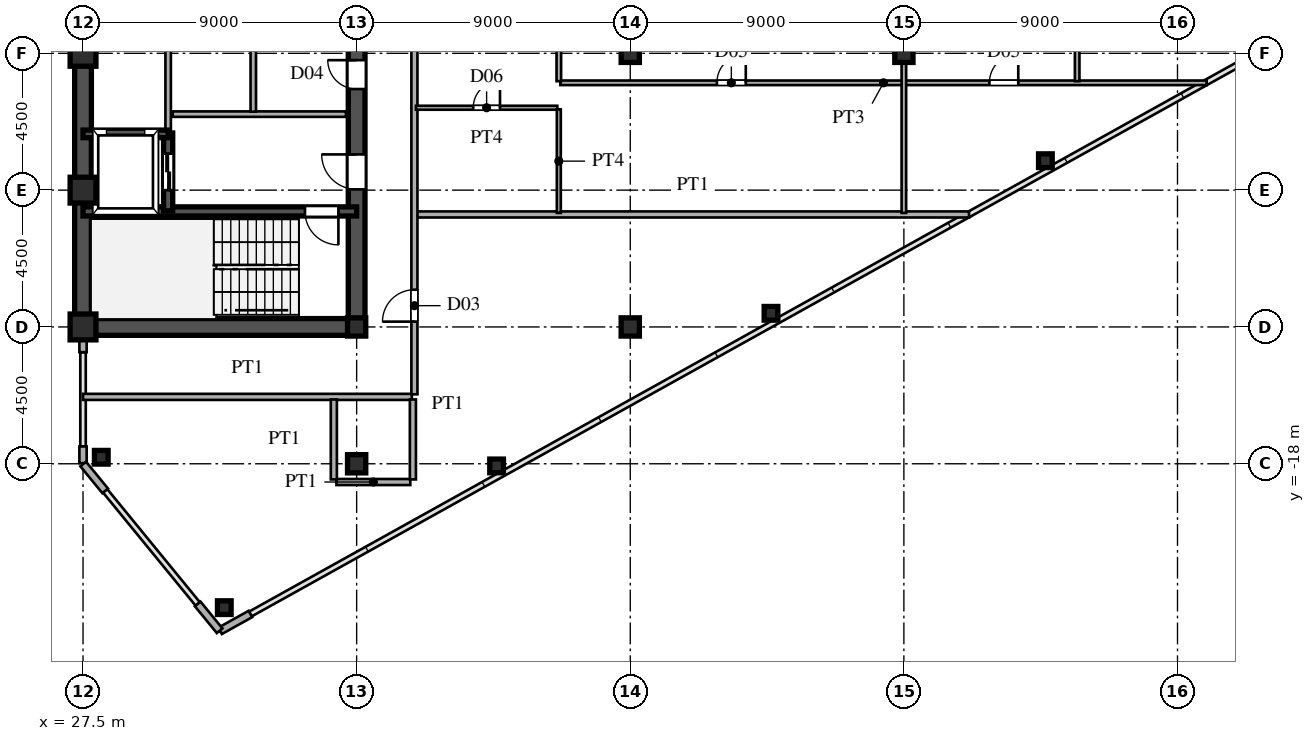
"""IFC4 building model, lengths in metres.
Left out: names, types, materials, properties, quantities, classifications, styles, units other than length and angle.
Written with IfcOpenShell. Run it as: python <this file> out.ifc"""

import sys

from ifc_helpers import new_model, si_unit, direction, frame, frame_2d, origin, origin_2d, place, context, subcontext, project, spatial, rectangle, hollow_rectangle, i_section, extrude, source, transform, mapped, element, fill, save


model = new_model("IFC4")
c1 = context("Model", 3, precision=1e-05, world=origin(), true_north=direction((0.0, 1.0)))
c2 = subcontext(c1, "Body", "Model", "MODEL_VIEW")
j1 = project(units=[si_unit("LENGTHUNIT", "METRE"), si_unit("PLANEANGLEUNIT", "RADIAN")], contexts=[c1])
p1 = place(None, origin())
s1 = spatial("IfcSite", under=j1, at=p1, CompositionType="ELEMENT")
p2 = place(p1, origin())
s2 = spatial("IfcBuilding", under=s1, at=p2, CompositionType="ELEMENT")
p3 = place(p2, frame((0.0, 0.0, 192.3)))
s3 = spatial("IfcBuildingStorey", under=s2, at=p3, CompositionType="ELEMENT", Elevation=192.3)
m1 = source(origin(), c2, "Body", "SweptSolid", [
    extrude(hollow_rectangle(XDim=0.85, YDim=0.85, WallThickness=0.036, at=origin_2d()), origin(), (0.0, 0.0, 1.0), 3.6),
])
for number, where, z_axis, x_axis in (
    (1, (27.5, -13.5, 0.0), (0.0, 0.0, 1.0), (1.0, 0.0, 0.0)),
    (2, (27.5, -9.0, 0.0), (0.0, 0.0, 1.0), (1.0, 0.0, 0.0)),
    (3, (27.5, -4.5, 0.0), (0.0, 0.0, 1.0), (1.0, 0.0, 0.0)),
):
    element("IfcColumn", number, at=place(p3, frame(where, z_axis=z_axis, x_axis=x_axis)), inside=s3, PredefinedType="COLUMN", context=c2, shape_type="MappedRepresentation", body=[
        mapped(m1, transform((0.0, 0.0, 0.0), scale=1.0)),
    ])
m2 = source(origin(), c2, "Body", "SweptSolid", [
    extrude(i_section(OverallWidth=0.6, OverallDepth=0.6, WebThickness=0.025, FlangeThickness=0.04, at=origin_2d()), origin(), (0.0, 0.0, 1.0), 3.6),
])
for number, where, z_axis, x_axis in (
    (4, (36.5, -18.0, 0.0), (0.0, 0.0, 1.0), (1.0, 0.0, 0.0)),
    (5, (36.5, -13.5, 0.0), (0.0, 0.0, 1.0), (1.0, 0.0, 0.0)),
    (6, (45.5, -13.5, 0.0), (0.0, 0.0, 1.0), (1.0, 0.0, 0.0)),
    (7, (45.5, -4.5, 0.0), (0.0, 0.0, 1.0), (1.0, 0.0, 0.0)),
    (8, (54.5, -4.5, 0.0), (0.0, 0.0, 1.0), (1.0, 0.0, 0.0)),
):
    element("IfcColumn", number, at=place(p3, frame(where, z_axis=z_axis, x_axis=x_axis)), inside=s3, PredefinedType="COLUMN", context=c2, shape_type="MappedRepresentation", body=[
        mapped(m2, transform((0.0, 0.0, 0.0), scale=1.0)),
    ])
m3 = source(origin(), c2, "Body", "SweptSolid", [
    extrude(hollow_rectangle(XDim=0.45, YDim=0.45, WallThickness=0.018, at=origin_2d()), origin(), (0.0, 0.0, 1.0), 3.6),
])
for number, where, z_axis, x_axis in (
    (9, (32.147, -22.732, 0.0), (0.0, 0.0, 1.0), (1.0, 0.0, 0.0)),
    (10, (28.1, -17.786, 0.0), (0.0, 0.0, 1.0), (1.0, 0.0, 0.0)),
    (11, (41.104, -18.071, 0.0), (0.0, 0.0, 1.0), (1.0, 0.0, 0.0)),
    (12, (50.129, -13.051, 0.0), (0.0, 0.0, 1.0), (1.0, 0.0, 0.0)),
    (13, (59.155, -8.031, 0.0), (0.0, 0.0, 1.0), (1.0, 0.0, 0.0)),
):
    element("IfcColumn", number, at=place(p3, frame(where, z_axis=z_axis, x_axis=x_axis)), inside=s3, PredefinedType="COLUMN", context=c2, shape_type="MappedRepresentation", body=[
        mapped(m3, transform((0.0, 0.0, 0.0), scale=1.0)),
    ])
p4 = place(p3, frame((32.009, -23.495, 0.0), z_axis=(0.0, 0.0, 1.0), x_axis=(0.87385402111, 0.486188389196, 0.0)))
e14 = element("IfcWall", 14, at=p4, inside=s3, PredefinedType="SOLIDWALL", context=c2, shape_type="SweptSolid", body=[
    extrude(rectangle(XDim=1.14, YDim=0.24, at=frame_2d((0.57, 0.0))), origin(), (0.0, 0.0, 1.0), 3.38),
])
p5 = place(p3, frame((27.5, -17.98, 0.0), z_axis=(0.0, 0.0, 1.0), x_axis=(0.0, 1.0, 0.0)))
e15 = element("IfcWall", 15, at=p5, inside=s3, PredefinedType="SOLIDWALL", context=c2, shape_type="SweptSolid", body=[
    extrude(rectangle(XDim=0.55, YDim=0.24, at=frame_2d((0.275, 0.0))), origin(), (0.0, 0.0, 1.0), 3.38),
])
p6 = place(p3, frame((27.5, -14.33, 0.0), z_axis=(0.0, 0.0, 1.0), x_axis=(0.0, 1.0, 0.0)))
e16 = element("IfcWall", 16, at=p6, inside=s3, PredefinedType="SOLIDWALL", context=c2, shape_type="SweptSolid", body=[
    extrude(rectangle(XDim=0.55, YDim=0.24, at=frame_2d((0.275, 0.0))), origin(), (0.0, 0.0, 1.0), 1.88),
])
for number, where, z_axis, x_axis in (
    (17, (27.506, -18.008, 0.0), (0.0, 0.0, 1.0), (0.633, -0.774, 0.0)),
    (18, (31.272, -22.61, 0.0), (0.0, 0.0, 1.0), (0.633, -0.774, 0.0)),
):
    element("IfcWall", number, at=place(p3, frame(where, z_axis=z_axis, x_axis=x_axis)), inside=s3, PredefinedType="SOLIDWALL", context=c2, shape_type="SweptSolid", body=[
        extrude(rectangle(XDim=1.14, YDim=0.24, at=frame_2d((0.57, 0.0))), origin(), (0.0, 0.0, 1.0), 3.38),
    ])
p7 = place(p3, frame((27.5, -13.5, 0.0), z_axis=(0.0, 0.0, 1.0), x_axis=(0.0, 1.0, 0.0)))
e19 = element("IfcWall", 19, at=p7, inside=s3, PredefinedType="SHEAR", context=c2, shape_type="SweptSolid", body=[
    extrude(rectangle(XDim=12.2, YDim=0.55, at=frame_2d((6.1, 0.0))), origin(), (0.0, 0.0, 1.0), 3.38),
])
p8 = place(p3, frame((27.5, -13.5, 0.0), z_axis=(0.0, 0.0, 1.0), x_axis=(1.0, 0.0, 0.0)))
e20 = element("IfcWall", 20, at=p8, inside=s3, PredefinedType="SHEAR", context=c2, shape_type="SweptSolid", body=[
    extrude(rectangle(XDim=9.0, YDim=0.55, at=frame_2d((4.5, 0.0))), origin(), (0.0, 0.0, 1.0), 3.38),
])
p9 = place(p3, frame((36.5, -13.65, 0.0), z_axis=(0.0, 0.0, 1.0), x_axis=(0.0, 1.0, 0.0)))
e21 = element("IfcWall", 21, at=p9, inside=s3, PredefinedType="SHEAR", context=c2, shape_type="SweptSolid", body=[
    extrude(rectangle(XDim=7.15, YDim=0.55, at=frame_2d((3.575, 0.0))), origin(), (0.0, 0.0, 1.0), 3.38),
])
p10 = place(p9, frame((4.675, 0.0, 0.0)))
e22 = element("IfcOpeningElement", 22, at=p10, cuts=e21, PredefinedType="OPENING", context=c2, shape_type="SweptSolid", body=[
    extrude(rectangle(XDim=1.15, YDim=2.2, at=frame_2d((0.575, 1.1))), frame((0.0, 0.285, 0.0), z_axis=(0.0, -1.0, 0.0), x_axis=(1.0, 0.0, 0.0)), (0.0, 0.0, 1.0), 0.57),
])
p11 = place(p3, frame((36.5, -6.5, 0.0), z_axis=(0.0, 0.0, 1.0), x_axis=(0.0, 1.0, 0.0)))
e23 = element("IfcWall", 23, at=p11, inside=s3, PredefinedType="SHEAR", context=c2, shape_type="SweptSolid", body=[
    extrude(rectangle(XDim=2.6, YDim=0.55, at=frame_2d((1.3, 0.0))), origin(), (0.0, 0.0, 1.0), 3.38),
])
p12 = place(p11, frame((0.825, 0.0, 0.0)))
e24 = element("IfcOpeningElement", 24, at=p12, cuts=e23, PredefinedType="OPENING", context=c2, shape_type="SweptSolid", body=[
    extrude(rectangle(XDim=0.95, YDim=2.15, at=frame_2d((0.475, 1.075))), frame((0.0, 0.285, 0.0), z_axis=(0.0, -1.0, 0.0), x_axis=(1.0, 0.0, 0.0)), (0.0, 0.0, 1.0), 0.57),
])
p13 = place(p3, frame((27.5, -9.7, 0.0), z_axis=(0.0, 0.0, 1.0), x_axis=(1.0, 0.0, 0.0)))
e25 = element("IfcWall", 25, at=p13, inside=s3, PredefinedType="SHEAR", context=c2, shape_type="SweptSolid", body=[
    extrude(rectangle(XDim=9.0, YDim=0.3, at=frame_2d((4.5, 0.0))), origin(), (0.0, 0.0, 1.0), 3.38),
])
p14 = place(p13, frame((7.3, 0.0, 0.0)))
e26 = element("IfcOpeningElement", 26, at=p14, cuts=e25, PredefinedType="OPENING", context=c2, shape_type="SweptSolid", body=[
    extrude(rectangle(XDim=1.1, YDim=2.2, at=frame_2d((0.55, 1.1))), frame((0.0, 0.16, 0.0), z_axis=(0.0, -1.0, 0.0), x_axis=(1.0, 0.0, 0.0)), (0.0, 0.0, 1.0), 0.32),
])
p15 = place(p3, frame((27.5, -7.15, 0.0), z_axis=(0.0, 0.0, 1.0), x_axis=(1.0, 0.0, 0.0)))
e27 = element("IfcWall", 27, at=p15, inside=s3, PredefinedType="SHEAR", context=c2, shape_type="SweptSolid", body=[
    extrude(rectangle(XDim=2.8, YDim=0.25, at=frame_2d((1.4, 0.0))), origin(), (0.0, 0.0, 1.0), 3.38),
])
p16 = place(p3, frame((30.3, -9.68, 0.0), z_axis=(0.0, 0.0, 1.0), x_axis=(0.0, 1.0, 0.0)))
e28 = element("IfcWall", 28, at=p16, inside=s3, PredefinedType="SHEAR", context=c2, shape_type="SweptSolid", body=[
    extrude(rectangle(XDim=2.56, YDim=0.3, at=frame_2d((1.28, 0.0))), origin(), (0.0, 0.0, 1.0), 3.38),
])
p17 = place(p16, frame((0.68, 0.0, 0.0)))
e29 = element("IfcOpeningElement", 29, at=p17, cuts=e28, PredefinedType="OPENING", context=c2, shape_type="SweptSolid", body=[
    extrude(rectangle(XDim=1.2, YDim=2.25, at=frame_2d((0.6, 1.125))), frame((0.0, 0.16, 0.0), z_axis=(0.0, -1.0, 0.0), x_axis=(1.0, 0.0, 0.0)), (0.0, 0.0, 1.0), 0.32),
])
p18 = place(p3, frame((30.45, -6.5, 0.0), z_axis=(0.0, 0.0, 1.0), x_axis=(1.0, 0.0, 0.0)))
e30 = element("IfcWall", 30, at=p18, inside=s3, PredefinedType="PARTITIONING", context=c2, shape_type="SweptSolid", body=[
    extrude(rectangle(XDim=5.7, YDim=0.18, at=frame_2d((2.85, 0.0))), origin(), (0.0, 0.0, 1.0), 3.38),
])
p19 = place(p3, frame((33.1, -6.42, 0.0), z_axis=(0.0, 0.0, 1.0), x_axis=(0.0, 1.0, 0.0)))
e31 = element("IfcWall", 31, at=p19, inside=s3, PredefinedType="PARTITIONING", context=c2, shape_type="SweptSolid", body=[
    extrude(rectangle(XDim=5.04, YDim=0.18, at=frame_2d((2.52, 0.0))), origin(), (0.0, 0.0, 1.0), 3.38),
])
p20 = place(p3, frame((30.3, -7.12, 0.0), z_axis=(0.0, 0.0, 1.0), x_axis=(0.0, 1.0, 0.0)))
e32 = element("IfcWall", 32, at=p20, inside=s3, PredefinedType="PARTITIONING", context=c2, shape_type="SweptSolid", body=[
    extrude(rectangle(XDim=5.74, YDim=0.18, at=frame_2d((2.87, 0.0))), origin(), (0.0, 0.0, 1.0), 3.38),
])
p21 = place(p3, frame((35.835, -18.6, 0.0), z_axis=(0.0, 0.0, 1.0), x_axis=(1.0, 0.0, 0.0)))
e33 = element("IfcWall", 33, at=p21, inside=s3, PredefinedType="PARTITIONING", context=c2, shape_type="SweptSolid", body=[
    extrude(rectangle(XDim=2.43, YDim=0.2, at=frame_2d((1.215, 0.0))), origin(), (0.0, 0.0, 1.0), 3.38),
])
p22 = place(p3, frame((27.5, -15.8, 0.0), z_axis=(0.0, 0.0, 1.0), x_axis=(1.0, 0.0, 0.0)))
e34 = element("IfcWall", 34, at=p22, inside=s3, PredefinedType="PARTITIONING", context=c2, shape_type="SweptSolid", body=[
    extrude(rectangle(XDim=10.815, YDim=0.2, at=frame_2d((5.407, 0.0))), origin(), (0.0, 0.0, 1.0), 3.38),
])
p23 = place(p3, frame((38.48, -9.8, 0.0), z_axis=(0.0, 0.0, 1.0), x_axis=(1.0, 0.0, 0.0)))
e35 = element("IfcWall", 35, at=p23, inside=s3, PredefinedType="PARTITIONING", context=c2, shape_type="SweptSolid", body=[
    extrude(rectangle(XDim=18.163, YDim=0.2, at=frame_2d((9.082, 0.0))), origin(), (0.0, 0.0, 1.0), 3.38),
])
p24 = place(p3, frame((38.45, -6.29, 0.0), z_axis=(0.0, 0.0, 1.0), x_axis=(1.0, 0.0, 0.0)))
e36 = element("IfcWall", 36, at=p24, inside=s3, PredefinedType="PARTITIONING", context=c2, shape_type="SweptSolid", body=[
    extrude(rectangle(XDim=4.65, YDim=0.13, at=frame_2d((2.325, 0.0))), origin(), (0.0, 0.0, 1.0), 3.38),
])
p25 = place(p24, frame((1.885, 0.0, 0.0)))
e37 = element("IfcOpeningElement", 37, at=p25, cuts=e36, PredefinedType="OPENING", context=c2, shape_type="SweptSolid", body=[
    extrude(rectangle(XDim=0.88, YDim=2.1, at=frame_2d((0.44, 1.05))), frame((0.0, 0.075, 0.0), z_axis=(0.0, -1.0, 0.0), x_axis=(1.0, 0.0, 0.0)), (0.0, 0.0, 1.0), 0.15),
])
p26 = place(p3, frame((43.2, -5.47, 0.0), z_axis=(0.0, 0.0, 1.0), x_axis=(1.0, 0.0, 0.0)))
e38 = element("IfcWall", 38, at=p26, inside=s3, PredefinedType="PARTITIONING", context=c2, shape_type="SweptSolid", body=[
    extrude(rectangle(XDim=21.259, YDim=0.15, at=frame_2d((10.629, 0.0))), origin(), (0.0, 0.0, 1.0), 3.38),
])
p27 = place(p26, frame((5.15, 0.0, 0.0)))
e39 = element("IfcOpeningElement", 39, at=p27, cuts=e38, PredefinedType="OPENING", context=c2, shape_type="SweptSolid", body=[
    extrude(rectangle(XDim=0.95, YDim=2.15, at=frame_2d((0.475, 1.075))), frame((0.0, 0.085, 0.0), z_axis=(0.0, -1.0, 0.0), x_axis=(1.0, 0.0, 0.0)), (0.0, 0.0, 1.0), 0.17),
])
p28 = place(p26, frame((14.113, 0.0, 0.0)))
e40 = element("IfcOpeningElement", 40, at=p28, cuts=e38, PredefinedType="OPENING", context=c2, shape_type="SweptSolid", body=[
    extrude(rectangle(XDim=0.95, YDim=2.15, at=frame_2d((0.475, 1.075))), frame((0.0, 0.085, 0.0), z_axis=(0.0, -1.0, 0.0), x_axis=(1.0, 0.0, 0.0)), (0.0, 0.0, 1.0), 0.17),
])
for number, where, z_axis, x_axis in (
    (41, (35.75, -18.515, 0.0), (0.0, 0.0, 1.0), (0.0, 1.0, 0.0)),
    (42, (38.35, -18.515, 0.0), (0.0, 0.0, 1.0), (0.0, 1.0, 0.0)),
):
    element("IfcWall", number, at=place(p3, frame(where, z_axis=z_axis, x_axis=x_axis)), inside=s3, PredefinedType="PARTITIONING", context=c2, shape_type="SweptSolid", body=[
        extrude(rectangle(XDim=2.63, YDim=0.2, at=frame_2d((1.315, 0.0))), origin(), (0.0, 0.0, 1.0), 3.38),
    ])
p29 = place(p3, frame((38.4, -15.715, 0.0), z_axis=(0.0, 0.0, 1.0), x_axis=(0.0, 1.0, 0.0)))
e43 = element("IfcWall", 43, at=p29, inside=s3, PredefinedType="PARTITIONING", context=c2, shape_type="SweptSolid", body=[
    extrude(rectangle(XDim=31.43, YDim=0.2, at=frame_2d((15.715, 0.0))), origin(), (0.0, 0.0, 1.0), 3.38),
])
p30 = place(p29, frame((2.39, 0.0, 0.0)))
e44 = element("IfcOpeningElement", 44, at=p30, cuts=e43, PredefinedType="OPENING", context=c2, shape_type="SweptSolid", body=[
    extrude(rectangle(XDim=1.05, YDim=2.25, at=frame_2d((0.525, 1.125))), frame((0.0, 0.11, 0.0), z_axis=(0.0, -1.0, 0.0), x_axis=(1.0, 0.0, 0.0)), (0.0, 0.0, 1.0), 0.22),
])
p31 = place(p29, frame((11.695, 0.0, 0.0)))
e45 = element("IfcOpeningElement", 45, at=p31, cuts=e43, PredefinedType="OPENING", context=c2, shape_type="SweptSolid", body=[
    extrude(rectangle(XDim=1.05, YDim=2.25, at=frame_2d((0.525, 1.125))), frame((0.0, 0.11, 0.0), z_axis=(0.0, -1.0, 0.0), x_axis=(1.0, 0.0, 0.0)), (0.0, 0.0, 1.0), 0.22),
])
p32 = place(p29, frame((24.69, 0.0, 0.0)))
e46 = element("IfcOpeningElement", 46, at=p32, cuts=e43, PredefinedType="OPENING", context=c2, shape_type="SweptSolid", body=[
    extrude(rectangle(XDim=1.05, YDim=2.25, at=frame_2d((0.525, 1.125))), frame((0.0, 0.11, 0.0), z_axis=(0.0, -1.0, 0.0), x_axis=(1.0, 0.0, 0.0)), (0.0, 0.0, 1.0), 0.22),
])
p33 = place(p3, frame((43.15, -9.75, 0.0), z_axis=(0.0, 0.0, 1.0), x_axis=(0.0, 1.0, 0.0)))
e47 = element("IfcWall", 47, at=p33, inside=s3, PredefinedType="PARTITIONING", context=c2, shape_type="SweptSolid", body=[
    extrude(rectangle(XDim=3.408, YDim=0.13, at=frame_2d((1.704, 0.0))), origin(), (0.0, 0.0, 1.0), 3.38),
])
p34 = place(p3, frame((43.15, -5.417, 0.0), z_axis=(0.0, 0.0, 1.0), x_axis=(0.0, 1.0, 0.0)))
e48 = element("IfcWall", 48, at=p34, inside=s3, PredefinedType="PARTITIONING", context=c2, shape_type="SweptSolid", body=[
    extrude(rectangle(XDim=4.234, YDim=0.15, at=frame_2d((2.117, 0.0))), origin(), (0.0, 0.0, 1.0), 2.99),
])
p35 = place(p34, frame((1.642, 0.0, 0.0)))
e49 = element("IfcOpeningElement", 49, at=p35, cuts=e48, PredefinedType="OPENING", context=c2, shape_type="SweptSolid", body=[
    extrude(rectangle(XDim=0.95, YDim=2.15, at=frame_2d((0.475, 1.075))), frame((0.0, 0.085, 0.0), z_axis=(0.0, -1.0, 0.0), x_axis=(1.0, 0.0, 0.0)), (0.0, 0.0, 1.0), 0.17),
])
p36 = place(p3, frame((54.5, -9.75, 0.0), z_axis=(0.0, 0.0, 1.0), x_axis=(0.0, 1.0, 0.0)))
e50 = element("IfcWall", 50, at=p36, inside=s3, PredefinedType="PARTITIONING", context=c2, shape_type="SweptSolid", body=[
    extrude(rectangle(XDim=12.9, YDim=0.15, at=frame_2d((6.45, 0.0))), origin(), (0.0, 0.0, 1.0), 2.78),
])
p37 = place(p36, frame((5.975, 0.0, 0.0)))
e51 = element("IfcOpeningElement", 51, at=p37, cuts=e50, PredefinedType="OPENING", context=c2, shape_type="SweptSolid", body=[
    extrude(rectangle(XDim=0.95, YDim=2.15, at=frame_2d((0.475, 1.075))), frame((0.0, 0.085, 0.0), z_axis=(0.0, -1.0, 0.0), x_axis=(1.0, 0.0, 0.0)), (0.0, 0.0, 1.0), 0.17),
])
p38 = place(p3, frame((60.2, -5.417, 0.0), z_axis=(0.0, 0.0, 1.0), x_axis=(0.0, 1.0, 0.0)))
e52 = element("IfcWall", 52, at=p38, inside=s3, PredefinedType="PARTITIONING", context=c2, shape_type="SweptSolid", body=[
    extrude(rectangle(XDim=8.567, YDim=0.15, at=frame_2d((4.283, 0.0))), origin(), (0.0, 0.0, 1.0), 3.38),
])
p39 = place(p38, frame((1.642, 0.0, 0.0)))
e53 = element("IfcOpeningElement", 53, at=p39, cuts=e52, PredefinedType="OPENING", context=c2, shape_type="SweptSolid", body=[
    extrude(rectangle(XDim=0.95, YDim=2.15, at=frame_2d((0.475, 1.075))), frame((0.0, 0.085, 0.0), z_axis=(0.0, -1.0, 0.0), x_axis=(1.0, 0.0, 0.0)), (0.0, 0.0, 1.0), 0.17),
])
m4 = source(origin(), c2, "Body", "SweptSolid", [
    extrude(rectangle(XDim=1.15, YDim=2.2, at=frame_2d((0.575, 1.1))), frame((0.0, 0.025, 0.0), z_axis=(0.0, -1.0, 0.0), x_axis=(1.0, 0.0, 0.0)), (0.0, 0.0, 1.0), 0.05),
])
p40 = place(p10, origin())
e54 = element("IfcDoor", 54, at=p40, inside=s3, OperationType="SINGLE_SWING_RIGHT", PredefinedType="DOOR", context=c2, shape_type="MappedRepresentation", body=[
    mapped(m4, transform((0.0, 0.0, 0.0), scale=1.0)),
])
fill(e22, e54)
m5 = source(origin(), c2, "Body", "SweptSolid", [
    extrude(rectangle(XDim=0.95, YDim=2.15, at=frame_2d((0.475, 1.075))), frame((0.0, 0.025, 0.0), z_axis=(0.0, -1.0, 0.0), x_axis=(1.0, 0.0, 0.0)), (0.0, 0.0, 1.0), 0.05),
])
p41 = place(p12, origin())
e55 = element("IfcDoor", 55, at=p41, inside=s3, OperationType="SINGLE_SWING_RIGHT", PredefinedType="DOOR", context=c2, shape_type="MappedRepresentation", body=[
    mapped(m5, transform((0.0, 0.0, 0.0), scale=1.0)),
])
fill(e24, e55)
m6 = source(origin(), c2, "Body", "SweptSolid", [
    extrude(rectangle(XDim=1.1, YDim=2.2, at=frame_2d((0.55, 1.1))), frame((0.0, 0.025, 0.0), z_axis=(0.0, -1.0, 0.0), x_axis=(1.0, 0.0, 0.0)), (0.0, 0.0, 1.0), 0.05),
])
p42 = place(p14, frame((1.1, 0.0, 0.0), z_axis=(0.0, 0.0, 1.0), x_axis=(-1.0, 0.0, 0.0)))
e56 = element("IfcDoor", 56, at=p42, inside=s3, OperationType="SINGLE_SWING_RIGHT", PredefinedType="DOOR", context=c2, shape_type="MappedRepresentation", body=[
    mapped(m6, transform((0.0, 0.0, 0.0), scale=1.0)),
])
fill(e26, e56)
m7 = source(origin(), c2, "Body", "SweptSolid", [
    extrude(rectangle(XDim=1.2, YDim=2.25, at=frame_2d((0.6, 1.125))), frame((0.0, 0.025, 0.0), z_axis=(0.0, -1.0, 0.0), x_axis=(1.0, 0.0, 0.0)), (0.0, 0.0, 1.0), 0.05),
])
p43 = place(p17, origin())
e57 = element("IfcDoor", 57, at=p43, inside=s3, OperationType="DOUBLE_DOOR_SLIDING", PredefinedType="DOOR", context=c2, shape_type="MappedRepresentation", body=[
    mapped(m7, transform((0.0, 0.0, 0.0), scale=1.0)),
])
fill(e29, e57)
m8 = source(origin(), c2, "Body", "SweptSolid", [
    extrude(rectangle(XDim=0.88, YDim=2.1, at=frame_2d((0.44, 1.05))), frame((0.0, 0.025, 0.0), z_axis=(0.0, -1.0, 0.0), x_axis=(1.0, 0.0, 0.0)), (0.0, 0.0, 1.0), 0.05),
])
p44 = place(p25, origin())
e58 = element("IfcDoor", 58, at=p44, inside=s3, OperationType="SINGLE_SWING_RIGHT", PredefinedType="DOOR", context=c2, shape_type="MappedRepresentation", body=[
    mapped(m8, transform((0.0, 0.0, 0.0), scale=1.0)),
])
fill(e37, e58)
m9 = source(origin(), c2, "Body", "SweptSolid", [
    extrude(rectangle(XDim=0.95, YDim=2.15, at=frame_2d((0.475, 1.075))), frame((0.0, 0.025, 0.0), z_axis=(0.0, -1.0, 0.0), x_axis=(1.0, 0.0, 0.0)), (0.0, 0.0, 1.0), 0.05),
])
p45 = place(p27, origin())
e59 = element("IfcDoor", 59, at=p45, inside=s3, OperationType="SINGLE_SWING_RIGHT", PredefinedType="DOOR", context=c2, shape_type="MappedRepresentation", body=[
    mapped(m9, transform((0.0, 0.0, 0.0), scale=1.0)),
])
fill(e39, e59)
p46 = place(p28, origin())
e60 = element("IfcDoor", 60, at=p46, inside=s3, OperationType="SINGLE_SWING_RIGHT", PredefinedType="DOOR", context=c2, shape_type="MappedRepresentation", body=[
    mapped(m9, transform((0.0, 0.0, 0.0), scale=1.0)),
])
fill(e40, e60)
m10 = source(origin(), c2, "Body", "SweptSolid", [
    extrude(rectangle(XDim=1.05, YDim=2.25, at=frame_2d((0.525, 1.125))), frame((0.0, 0.025, 0.0), z_axis=(0.0, -1.0, 0.0), x_axis=(1.0, 0.0, 0.0)), (0.0, 0.0, 1.0), 0.05),
])
p47 = place(p30, origin())
e61 = element("IfcDoor", 61, at=p47, inside=s3, OperationType="SINGLE_SWING_LEFT", PredefinedType="DOOR", context=c2, shape_type="MappedRepresentation", body=[
    mapped(m10, transform((0.0, 0.0, 0.0), scale=1.0)),
])
fill(e44, e61)
save(model, sys.argv[1])
